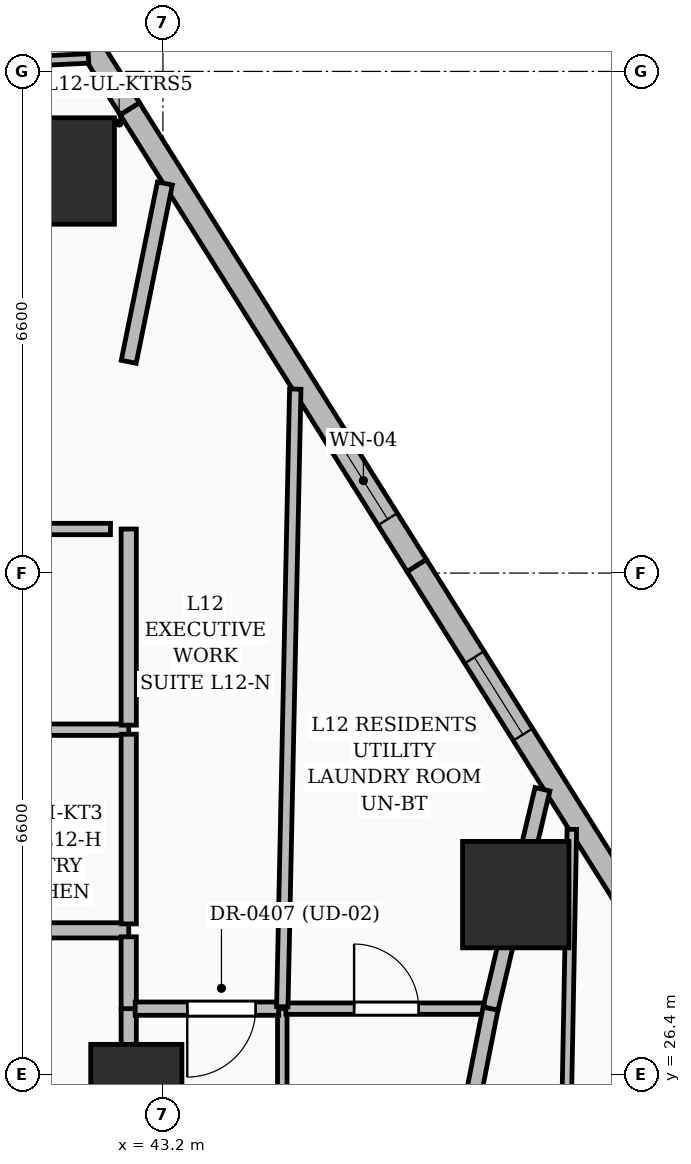
"""IFC4 building model, lengths in metres.
Left out: names, types, materials, properties, quantities, classifications, styles, units other than length and angle.
Written with IfcOpenShell. Run it as: python <this file> out.ifc"""

import sys

from ifc_helpers import new_model, si_unit, direction, frame, frame_2d, origin, origin_2d, place, context, subcontext, project, spatial, rectangle, extrude, element, fill, save


model = new_model("IFC4")
c1 = context("Model", 3, precision=1e-05, world=origin(), true_north=direction((0.0, 1.0)))
c2 = subcontext(c1, "Body", "Model", "MODEL_VIEW")
j1 = project(units=[si_unit("LENGTHUNIT", "METRE"), si_unit("PLANEANGLEUNIT", "RADIAN")], contexts=[c1])
p1 = place(None, origin())
s1 = spatial("IfcSite", under=j1, at=p1, CompositionType="ELEMENT")
p2 = place(p1, origin())
s2 = spatial("IfcBuilding", under=s1, at=p2, CompositionType="ELEMENT")
p3 = place(p2, frame((0.0, 0.0, 53.4)))
s3 = spatial("IfcBuildingStorey", under=s2, at=p3, CompositionType="ELEMENT", Elevation=53.4)
p4 = place(p3, frame((42.85, 26.2, 0.0), z_axis=(0.0, 0.0, 1.0), x_axis=(1.0, 0.0, 0.0)))
e1 = element("IfcColumn", 1, at=p4, inside=s3, PredefinedType="COLUMN", context=c2, shape_type="SweptSolid", body=[
    extrude(rectangle(XDim=1.2, YDim=1.2, at=origin_2d()), origin(), (0.0, 0.0, 1.0), 3.6),
])
for number, where, z_axis, x_axis in (
    (2, (47.842, 28.77, 0.0), (0.0, 0.0, 1.0), (1.0, 0.0, 0.0)),
    (3, (41.862, 38.29, 0.0), (0.0, 0.0, 1.0), (1.0, 0.0, 0.0)),
):
    element("IfcColumn", number, at=place(p3, frame(where, z_axis=z_axis, x_axis=x_axis)), inside=s3, PredefinedType="COLUMN", context=c2, shape_type="SweptSolid", body=[
        extrude(rectangle(XDim=1.4, YDim=1.4, at=origin_2d()), origin(), (0.0, 0.0, 1.0), 3.6),
    ])
p5 = place(p3, frame((39.287, 44.646, 0.0), z_axis=(0.0, 0.0, 1.0), x_axis=(0.531900124003, -0.846807096147, 0.0)))
e4 = element("IfcWall", 4, at=p5, inside=s3, PredefinedType="SOLIDWALL", context=c2, shape_type="SweptSolid", body=[
    extrude(rectangle(XDim=6.54, YDim=0.3, at=frame_2d((3.27, 0.0))), origin(), (0.0, 0.0, 1.0), 3.35),
])
p6 = place(p5, frame((2.42, 0.0, 0.55)))
e5 = element("IfcOpeningElement", 5, at=p6, cuts=e4, PredefinedType="OPENING", context=c2, shape_type="SweptSolid", body=[
    extrude(rectangle(XDim=1.6, YDim=2.2, at=frame_2d((0.8, 1.1))), frame((0.0, 0.16, 0.0), z_axis=(0.0, -1.0, 0.0), x_axis=(1.0, 0.0, 0.0)), (0.0, 0.0, 1.0), 0.32),
])
p7 = place(p3, frame((42.765, 39.107, 0.0), z_axis=(0.0, 0.0, 1.0), x_axis=(0.531921360547, -0.846793756586, 0.0)))
e6 = element("IfcWall", 6, at=p7, inside=s3, PredefinedType="SOLIDWALL", context=c2, shape_type="SweptSolid", body=[
    extrude(rectangle(XDim=7.095, YDim=0.3, at=frame_2d((3.548, 0.0))), origin(), (0.0, 0.0, 1.0), 3.35),
])
p8 = place(p7, frame((5.175, 0.0, 0.8)))
e7 = element("IfcOpeningElement", 7, at=p8, cuts=e6, PredefinedType="OPENING", context=c2, shape_type="SweptSolid", body=[
    extrude(rectangle(XDim=1.2, YDim=1.8, at=frame_2d((0.6, 0.9))), frame((0.0, 0.16, 0.0), z_axis=(0.0, -1.0, 0.0), x_axis=(1.0, 0.0, 0.0)), (0.0, 0.0, 1.0), 0.32),
])
p9 = place(p3, frame((46.54, 33.099, 0.0), z_axis=(0.0, 0.0, 1.0), x_axis=(0.531881188868, -0.846818989471, 0.0)))
e8 = element("IfcWall", 8, at=p9, inside=s3, PredefinedType="SOLIDWALL", context=c2, shape_type="SweptSolid", body=[
    extrude(rectangle(XDim=7.095, YDim=0.3, at=frame_2d((3.548, 0.0))), origin(), (0.0, 0.0, 1.0), 3.35),
])
p10 = place(p9, frame((5.05, 0.0, 0.8)))
e9 = element("IfcOpeningElement", 9, at=p10, cuts=e8, PredefinedType="OPENING", context=c2, shape_type="SweptSolid", body=[
    extrude(rectangle(XDim=1.2, YDim=1.8, at=frame_2d((0.6, 0.9))), frame((0.0, 0.16, 0.0), z_axis=(0.0, -1.0, 0.0), x_axis=(1.0, 0.0, 0.0)), (0.0, 0.0, 1.0), 0.32),
])
p11 = place(p9, frame((1.425, 0.0, 0.8)))
e10 = element("IfcOpeningElement", 10, at=p11, cuts=e8, PredefinedType="OPENING", context=c2, shape_type="SweptSolid", body=[
    extrude(rectangle(XDim=1.2, YDim=1.8, at=frame_2d((0.6, 0.9))), frame((0.0, 0.16, 0.0), z_axis=(0.0, -1.0, 0.0), x_axis=(1.0, 0.0, 0.0)), (0.0, 0.0, 1.0), 0.32),
])
p12 = place(p3, frame((50.159, 27.1, 0.0), z_axis=(0.0, 0.0, 1.0), x_axis=(-0.589910976018, -0.80746829063, 0.0)))
e11 = element("IfcWall", 11, at=p12, inside=s3, PredefinedType="SOLIDWALL", context=c2, shape_type="SweptSolid", body=[
    extrude(rectangle(XDim=2.318, YDim=0.3, at=frame_2d((1.159, 0.0))), origin(), (0.0, 0.0, 1.0), 2.375),
])
p13 = place(p3, frame((42.75, 28.3, 0.0), z_axis=(0.0, 0.0, 1.0), x_axis=(-1.0, 0.0, 0.0)))
e12 = element("IfcWall", 12, at=p13, inside=s3, PredefinedType="PARTITIONING", context=c2, shape_type="SweptSolid", body=[
    extrude(rectangle(XDim=3.35, YDim=0.2, at=frame_2d((1.675, 0.0))), origin(), (0.0, 0.0, 1.0), 2.279),
])
p14 = place(p3, frame((42.75, 24.56, 0.0), z_axis=(0.0, 0.0, 1.0), x_axis=(0.0, 1.0, 0.0)))
e13 = element("IfcWall", 13, at=p14, inside=s3, PredefinedType="PARTITIONING", context=c2, shape_type="SweptSolid", body=[
    extrude(rectangle(XDim=2.71, YDim=0.2, at=frame_2d((1.355, 0.0))), origin(), (0.0, 0.0, 1.0), 2.279),
])
p15 = place(p3, frame((42.75, 27.27, 0.0), z_axis=(0.0, 0.0, 1.0), x_axis=(0.0, 1.0, 0.0)))
e14 = element("IfcWall", 14, at=p15, inside=s3, PredefinedType="PARTITIONING", context=c2, shape_type="SweptSolid", body=[
    extrude(rectangle(XDim=0.945, YDim=0.2, at=frame_2d((0.473, 0.0))), origin(), (0.0, 0.0, 1.0), 2.279),
])
p16 = place(p3, frame((48.58, 29.629, 0.0), z_axis=(0.0, 0.0, 1.0), x_axis=(-0.01892705246, -0.999820867298, 0.0)))
e15 = element("IfcWall", 15, at=p16, inside=s3, PredefinedType="PARTITIONING", context=c2, shape_type="SweptSolid", body=[
    extrude(rectangle(XDim=8.991, YDim=0.125, at=frame_2d((4.495, 0.0))), origin(), (0.0, 0.0, 1.0), 2.37),
])
p17 = place(p16, frame((4.403, 0.0, 0.0)))
e16 = element("IfcOpeningElement", 16, at=p17, cuts=e15, PredefinedType="OPENING", context=c2, shape_type="SweptSolid", body=[
    extrude(rectangle(XDim=0.9, YDim=2.15, at=frame_2d((0.45, 1.075))), frame((0.0, 0.072, 0.0), z_axis=(0.0, -1.0, 0.0), x_axis=(1.0, 0.0, 0.0)), (0.0, 0.0, 1.0), 0.145),
])
p18 = place(p3, frame((48.193, 30.156, 0.0), z_axis=(0.0, 0.0, 1.0), x_axis=(-0.230296152423, -0.973120589742, 0.0)))
e17 = element("IfcWall", 17, at=p18, inside=s3, PredefinedType="PARTITIONING", context=c2, shape_type="SweptSolid", body=[
    extrude(rectangle(XDim=2.966, YDim=0.2, at=frame_2d((1.483, 0.0))), origin(), (0.0, 0.0, 1.0), 2.279),
])
p19 = place(p3, frame((42.75, 30.94, 0.0), z_axis=(0.0, 0.0, 1.0), x_axis=(-1.0, 0.0, 0.0)))
e18 = element("IfcWall", 18, at=p19, inside=s3, PredefinedType="PARTITIONING", context=c2, shape_type="SweptSolid", body=[
    extrude(rectangle(XDim=3.302, YDim=0.15, at=frame_2d((1.651, 0.0))), origin(), (0.0, 0.0, 1.0), 2.279),
])
p20 = place(p19, frame((1.192, 0.0, 0.0)))
e19 = element("IfcOpeningElement", 19, at=p20, cuts=e18, PredefinedType="OPENING", context=c2, shape_type="SweptSolid", body=[
    extrude(rectangle(XDim=0.85, YDim=2.1, at=frame_2d((0.425, 1.05))), frame((0.0, 0.085, 0.0), z_axis=(0.0, -1.0, 0.0), x_axis=(1.0, 0.0, 0.0)), (0.0, 0.0, 1.0), 0.17),
])
p21 = place(p3, frame((42.75, 28.385, 0.0), z_axis=(0.0, 0.0, 1.0), x_axis=(0.0, 1.0, 0.0)))
e20 = element("IfcWall", 20, at=p21, inside=s3, PredefinedType="PARTITIONING", context=c2, shape_type="SweptSolid", body=[
    extrude(rectangle(XDim=2.495, YDim=0.2, at=frame_2d((1.248, 0.0))), origin(), (0.0, 0.0, 1.0), 2.279),
])
p22 = place(p3, frame((42.75, 31.0, 0.0), z_axis=(0.0, 0.0, 1.0), x_axis=(0.0, 1.0, 0.0)))
e21 = element("IfcWall", 21, at=p22, inside=s3, PredefinedType="PARTITIONING", context=c2, shape_type="SweptSolid", body=[
    extrude(rectangle(XDim=2.58, YDim=0.2, at=frame_2d((1.29, 0.0))), origin(), (0.0, 0.0, 1.0), 2.279),
])
p23 = place(p3, frame((44.77, 17.835, 0.0), z_axis=(0.0, 0.0, 1.0), x_axis=(0.0, 1.0, 0.0)))
e22 = element("IfcWall", 22, at=p23, inside=s3, PredefinedType="PARTITIONING", context=c2, shape_type="SweptSolid", body=[
    extrude(rectangle(XDim=9.435, YDim=0.125, at=frame_2d((4.718, 0.0))), origin(), (0.0, 0.0, 1.0), 2.309),
])
p24 = place(p23, frame((4.2, 0.0, 0.0)))
e23 = element("IfcOpeningElement", 23, at=p24, cuts=e22, PredefinedType="OPENING", context=c2, shape_type="SweptSolid", body=[
    extrude(rectangle(XDim=0.95, YDim=2.2, at=frame_2d((0.475, 1.1))), frame((0.0, 0.072, 0.0), z_axis=(0.0, -1.0, 0.0), x_axis=(1.0, 0.0, 0.0)), (0.0, 0.0, 1.0), 0.145),
])
p25 = place(p3, frame((44.722, 27.27, 0.0), z_axis=(0.0, 0.0, 1.0), x_axis=(-1.0, 0.0, 0.0)))
e24 = element("IfcWall", 24, at=p25, inside=s3, PredefinedType="PARTITIONING", context=c2, shape_type="SweptSolid", body=[
    extrude(rectangle(XDim=1.887, YDim=0.175, at=frame_2d((0.944, 0.0))), origin(), (0.0, 0.0, 1.0), 2.279),
])
p26 = place(p25, frame((0.302, 0.0, 0.0)))
e25 = element("IfcOpeningElement", 25, at=p26, cuts=e24, PredefinedType="OPENING", context=c2, shape_type="SweptSolid", body=[
    extrude(rectangle(XDim=0.9, YDim=2.15, at=frame_2d((0.45, 1.075))), frame((0.0, 0.097, 0.0), z_axis=(0.0, -1.0, 0.0), x_axis=(1.0, 0.0, 0.0)), (0.0, 0.0, 1.0), 0.195),
])
p27 = place(p3, frame((44.817, 27.27, 0.0), z_axis=(0.0, 0.0, 1.0), x_axis=(1.0, 0.0, 0.0)))
e26 = element("IfcWall", 26, at=p27, inside=s3, PredefinedType="PARTITIONING", context=c2, shape_type="SweptSolid", body=[
    extrude(rectangle(XDim=2.608, YDim=0.15, at=frame_2d((1.304, 0.0))), origin(), (0.0, 0.0, 1.0), 2.279),
])
p28 = place(p27, frame((0.897, 0.0, 0.0)))
e27 = element("IfcOpeningElement", 27, at=p28, cuts=e26, PredefinedType="OPENING", context=c2, shape_type="SweptSolid", body=[
    extrude(rectangle(XDim=0.85, YDim=2.1, at=frame_2d((0.425, 1.05))), frame((0.0, 0.085, 0.0), z_axis=(0.0, -1.0, 0.0), x_axis=(1.0, 0.0, 0.0)), (0.0, 0.0, 1.0), 0.17),
])
p29 = place(p3, frame((44.941, 35.421, 0.0), z_axis=(0.0, 0.0, 1.0), x_axis=(-0.020966427288, -0.999780180303, 0.0)))
e28 = element("IfcWall", 28, at=p29, inside=s3, PredefinedType="PARTITIONING", context=c2, shape_type="SweptSolid", body=[
    extrude(rectangle(XDim=8.128, YDim=0.15, at=frame_2d((4.064, 0.0))), origin(), (0.0, 0.0, 1.0), 2.37),
])
p30 = place(p3, frame((43.226, 38.126, 0.0), z_axis=(0.0, 0.0, 1.0), x_axis=(-0.198880858248, -0.980023675338, 0.0)))
e29 = element("IfcWall", 29, at=p30, inside=s3, PredefinedType="PARTITIONING", context=c2, shape_type="SweptSolid", body=[
    extrude(rectangle(XDim=2.394, YDim=0.2, at=frame_2d((1.197, 0.0))), origin(), (0.0, 0.0, 1.0), 2.37),
])
p31 = place(p3, frame((40.33, 39.68, 0.0), z_axis=(0.0, 0.0, 1.0), x_axis=(0.998842315683, 0.048104349096, 0.0)))
e30 = element("IfcWall", 30, at=p31, inside=s3, PredefinedType="PARTITIONING", context=c2, shape_type="SweptSolid", body=[
    extrude(rectangle(XDim=1.893, YDim=0.125, at=frame_2d((0.947, 0.0))), origin(), (0.0, 0.0, 1.0), 3.35),
])
p32 = place(p3, frame((47.51, 27.27, 0.0), z_axis=(0.0, 0.0, 1.0), x_axis=(-0.193738465681, -0.981053213091, 0.0)))
e31 = element("IfcWall", 31, at=p32, inside=s3, PredefinedType="PARTITIONING", context=c2, shape_type="SweptSolid", body=[
    extrude(rectangle(XDim=9.619, YDim=0.2, at=frame_2d((4.809, 0.0))), origin(), (0.0, 0.0, 1.0), 2.279),
])
p33 = place(p3, frame((42.51, 33.58, 0.0), z_axis=(0.0, 0.0, 1.0), x_axis=(-1.0, 0.0, 0.0)))
e32 = element("IfcWall", 32, at=p33, inside=s3, PredefinedType="PARTITIONING", context=c2, shape_type="SweptSolid", body=[
    extrude(rectangle(XDim=2.895, YDim=0.15, at=frame_2d((1.448, 0.0))), origin(), (0.0, 0.0, 1.0), 2.279),
])
p34 = place(p8, origin())
e33 = element("IfcWindow", 33, at=p34, inside=s3, PartitioningType="SINGLE_PANEL", PredefinedType="WINDOW", context=c2, shape_type="SweptSolid", body=[
    extrude(rectangle(XDim=1.2, YDim=1.8, at=frame_2d((0.6, 0.9))), frame((0.0, 0.03, 0.0), z_axis=(0.0, -1.0, 0.0), x_axis=(1.0, 0.0, 0.0)), (0.0, 0.0, 1.0), 0.06),
])
fill(e7, e33)
p35 = place(p11, origin())
e34 = element("IfcWindow", 34, at=p35, inside=s3, PartitioningType="SINGLE_PANEL", PredefinedType="WINDOW", context=c2, shape_type="SweptSolid", body=[
    extrude(rectangle(XDim=1.2, YDim=1.8, at=frame_2d((0.6, 0.9))), frame((0.0, 0.03, 0.0), z_axis=(0.0, -1.0, 0.0), x_axis=(1.0, 0.0, 0.0)), (0.0, 0.0, 1.0), 0.06),
])
fill(e10, e34)
p36 = place(p28, origin())
e35 = element("IfcDoor", 35, at=p36, inside=s3, OperationType="SINGLE_SWING_LEFT", PredefinedType="DOOR", context=c2, shape_type="SweptSolid", body=[
    extrude(rectangle(XDim=0.85, YDim=2.1, at=frame_2d((0.425, 1.05))), frame((0.0, 0.025, 0.0), z_axis=(0.0, -1.0, 0.0), x_axis=(1.0, 0.0, 0.0)), (0.0, 0.0, 1.0), 0.05),
])
fill(e27, e35)
p37 = place(p26, origin())
e36 = element("IfcDoor", 36, at=p37, inside=s3, OperationType="SINGLE_SWING_RIGHT", PredefinedType="DOOR", context=c2, shape_type="SweptSolid", body=[
    extrude(rectangle(XDim=0.9, YDim=2.15, at=frame_2d((0.45, 1.075))), frame((0.0, 0.025, 0.0), z_axis=(0.0, -1.0, 0.0), x_axis=(1.0, 0.0, 0.0)), (0.0, 0.0, 1.0), 0.05),
])
fill(e25, e36)
save(model, sys.argv[1])
